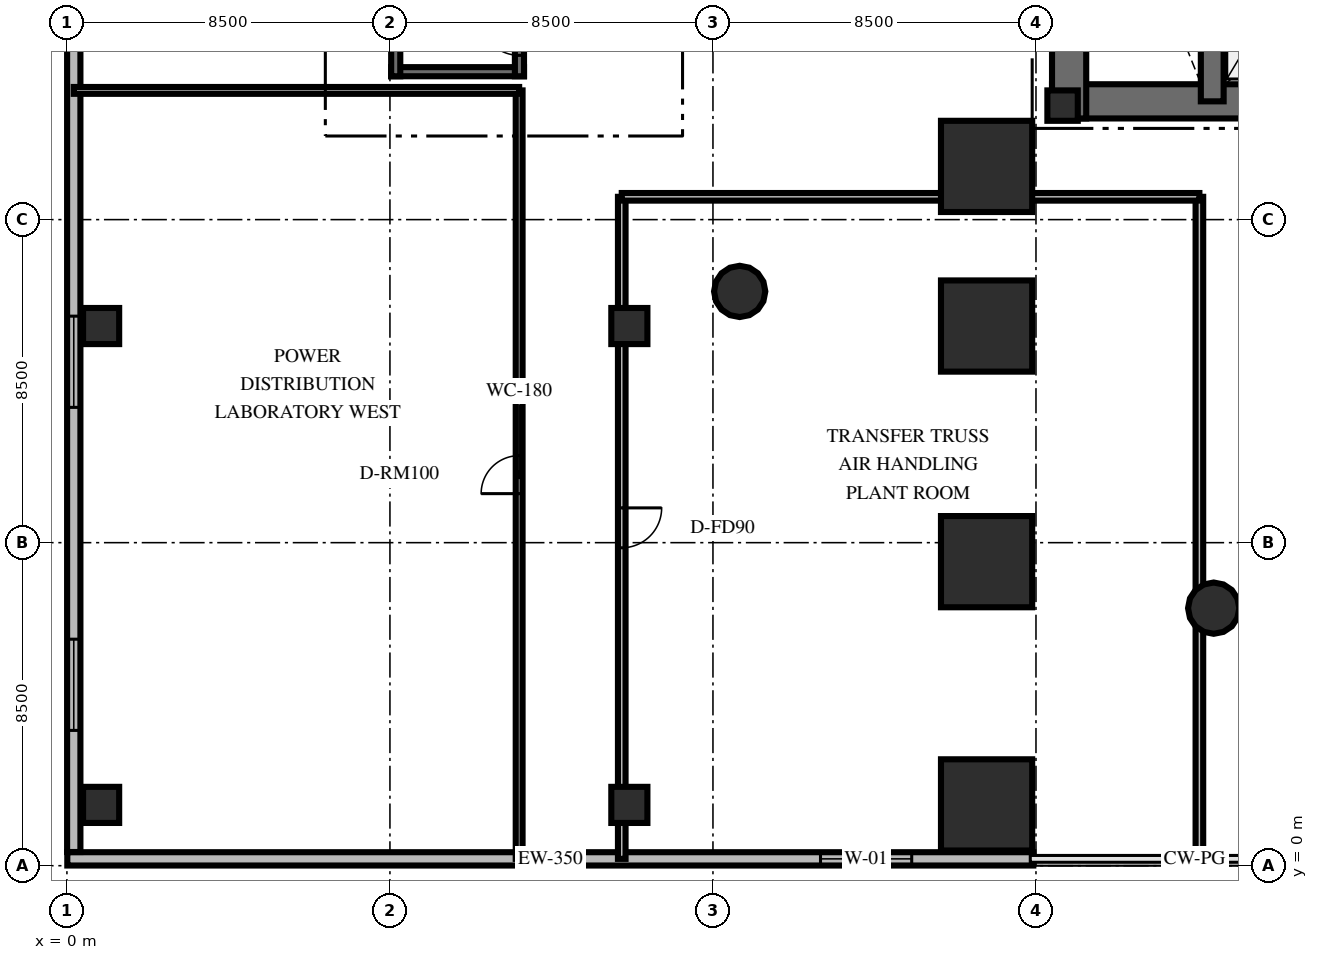
"""IFC4 building model, lengths in metres.
Left out: names, types, materials, properties, quantities, classifications, styles, units other than length and angle.
Written with IfcOpenShell. Run it as: python <this file> out.ifc"""

import sys

from ifc_helpers import new_model, si_unit, direction, frame, frame_2d, origin, origin_2d, place, context, subcontext, project, spatial, rectangle, circle, extrude, element, fill, save


model = new_model("IFC4")
c1 = context("Model", 3, precision=1e-05, world=origin(), true_north=direction((0.0, 1.0)))
c2 = subcontext(c1, "Body", "Model", "MODEL_VIEW")
j1 = project(units=[si_unit("LENGTHUNIT", "METRE"), si_unit("PLANEANGLEUNIT", "RADIAN")], contexts=[c1])
p1 = place(None, origin())
s1 = spatial("IfcSite", under=j1, at=p1, CompositionType="ELEMENT")
p2 = place(p1, origin())
s2 = spatial("IfcBuilding", under=s1, at=p2, CompositionType="ELEMENT")
p3 = place(p2, frame((0.0, 0.0, 15.6)))
s3 = spatial("IfcBuildingStorey", under=s2, at=p3, CompositionType="ELEMENT", Elevation=15.6)
p4 = place(p3, frame((25.922, 20.112, 0.0), z_axis=(0.0, 0.0, 1.0), x_axis=(1.0, 0.0, 0.0)))
e1 = element("IfcWall", 1, at=p4, inside=s3, PredefinedType="SHEAR", context=c2, shape_type="SweptSolid", body=[
    extrude(rectangle(XDim=16.166, YDim=0.9, at=frame_2d((8.083, 0.0))), origin(), (0.0, 0.0, 1.0), 4.8),
])
p5 = place(p3, frame((26.372, 19.662, 0.0), z_axis=(0.0, 0.0, 1.0), x_axis=(0.0, 1.0, 0.0)))
e2 = element("IfcWall", 2, at=p5, inside=s3, PredefinedType="SHEAR", context=c2, shape_type="SweptSolid", body=[
    extrude(rectangle(XDim=10.876, YDim=0.9, at=frame_2d((5.438, 0.0))), origin(), (0.0, 0.0, 1.0), 4.8),
])
p6 = place(p3, frame((30.138, 20.112, 0.0), z_axis=(0.0, 0.0, 1.0), x_axis=(0.0, 1.0, 0.0)))
e3 = element("IfcWall", 3, at=p6, inside=s3, PredefinedType="SHEAR", context=c2, shape_type="SweptSolid", body=[
    extrude(rectangle(XDim=9.976, YDim=0.6, at=frame_2d((4.988, 0.0))), origin(), (0.0, 0.0, 1.0), 4.8),
])
p7 = place(p3, frame((26.2, 20.0, 0.0), z_axis=(0.0, 0.0, 1.0), x_axis=(1.0, 0.0, 0.0)))
e4 = element("IfcColumn", 4, at=p7, inside=s3, PredefinedType="PILASTER", context=c2, shape_type="SweptSolid", body=[
    extrude(rectangle(XDim=0.8, YDim=0.8, at=origin_2d()), origin(), (0.0, 0.0, 1.0), 4.8),
])
p8 = place(p3, frame((8.532, 20.892, 0.0), z_axis=(0.0, 0.0, 1.0), x_axis=(1.0, 0.0, 0.0)))
e5 = element("IfcWall", 5, at=p8, inside=s3, PredefinedType="SHEAR", context=c2, shape_type="SweptSolid", body=[
    extrude(rectangle(XDim=3.496, YDim=0.24, at=frame_2d((1.748, 0.0))), origin(), (0.0, 0.0, 1.0), 4.8),
])
p9 = place(p3, frame((8.652, 20.772, 0.0), z_axis=(0.0, 0.0, 1.0), x_axis=(0.0, 1.0, 0.0)))
e6 = element("IfcWall", 6, at=p9, inside=s3, PredefinedType="SHEAR", context=c2, shape_type="SweptSolid", body=[
    extrude(rectangle(XDim=9.556, YDim=0.24, at=frame_2d((4.778, 0.0))), origin(), (0.0, 0.0, 1.0), 4.8),
])
p10 = place(p3, frame((11.908, 20.772, 0.0), z_axis=(0.0, 0.0, 1.0), x_axis=(0.0, 1.0, 0.0)))
e7 = element("IfcWall", 7, at=p10, inside=s3, PredefinedType="SHEAR", context=c2, shape_type="SweptSolid", body=[
    extrude(rectangle(XDim=9.556, YDim=0.24, at=frame_2d((4.778, 0.0))), origin(), (0.0, 0.0, 1.0), 4.8),
])
p11 = place(p10, frame((0.55, 0.0, 0.0)))
e8 = element("IfcOpeningElement", 8, at=p11, cuts=e7, PredefinedType="OPENING", context=c2, shape_type="SweptSolid", body=[
    extrude(rectangle(XDim=1.05, YDim=2.15, at=frame_2d((0.525, 1.075))), frame((0.0, 0.13, 0.0), z_axis=(0.0, -1.0, 0.0), x_axis=(1.0, 0.0, 0.0)), (0.0, 0.0, 1.0), 0.26),
])
for number, where, z_axis, x_axis in (
    (9, (24.2, 1.6, 0.0), (0.0, 0.0, 1.0), (1.0, 0.0, 0.0)),
    (10, (24.2, 8.0, 0.0), (0.0, 0.0, 1.0), (1.0, 0.0, 0.0)),
    (11, (24.2, 14.2, 0.0), (0.0, 0.0, 1.0), (1.0, 0.0, 0.0)),
    (12, (24.2, 18.4, 0.0), (0.0, 0.0, 1.0), (1.0, 0.0, 0.0)),
):
    element("IfcColumn", number, at=place(p3, frame(where, z_axis=z_axis, x_axis=x_axis)), inside=s3, PredefinedType="USERDEFINED", context=c2, shape_type="SweptSolid", body=[
        extrude(rectangle(XDim=2.4, YDim=2.4, at=origin_2d()), origin(), (0.0, 0.0, 1.0), 4.8),
    ])
for number, where, z_axis, x_axis in (
    (13, (0.9, 1.6, 0.0), (0.0, 0.0, 1.0), (1.0, 0.0, 0.0)),
    (14, (0.9, 14.2, 0.0), (0.0, 0.0, 1.0), (1.0, 0.0, 0.0)),
    (15, (14.8, 1.6, 0.0), (0.0, 0.0, 1.0), (1.0, 0.0, 0.0)),
    (16, (14.8, 14.2, 0.0), (0.0, 0.0, 1.0), (1.0, 0.0, 0.0)),
):
    element("IfcColumn", number, at=place(p3, frame(where, z_axis=z_axis, x_axis=x_axis)), inside=s3, PredefinedType="COLUMN", context=c2, shape_type="SweptSolid", body=[
        extrude(rectangle(XDim=0.95, YDim=0.95, at=origin_2d()), origin(), (0.0, 0.0, 1.0), 4.8),
    ])
p12 = place(p3, frame((17.703, 15.111, 0.0), z_axis=(0.0, 0.0, 1.0), x_axis=(1.0, 0.0, 0.0)))
e17 = element("IfcColumn", 17, at=p12, inside=s3, PredefinedType="COLUMN", context=c2, shape_type="SweptSolid", body=[
    extrude(circle(Radius=0.675, at=origin_2d()), origin(), (0.0, 0.0, 1.0), 4.8),
])
p13 = place(p3, frame((30.176, 6.777, -0.32), z_axis=(0.0, 0.0, 1.0), x_axis=(1.0, 0.0, 0.0)))
e18 = element("IfcColumn", 18, at=p13, inside=s3, PredefinedType="COLUMN", context=c2, shape_type="SweptSolid", body=[
    extrude(circle(Radius=0.675, at=origin_2d()), origin(), (0.0, 0.0, 1.0), 5.12),
])
p14 = place(p3, frame((25.43, 0.18, 0.0), z_axis=(0.0, 0.0, 1.0), x_axis=(-1.0, 0.0, 0.0)))
e19 = element("IfcWall", 19, at=p14, inside=s3, PredefinedType="SOLIDWALL", context=c2, shape_type="SweptSolid", body=[
    extrude(rectangle(XDim=25.42, YDim=0.35, at=frame_2d((12.71, 0.0))), origin(), (0.0, 0.0, 1.0), 3.76),
])
p15 = place(p14, frame((3.2, 0.0, 0.85)))
e20 = element("IfcOpeningElement", 20, at=p15, cuts=e19, PredefinedType="OPENING", context=c2, shape_type="SweptSolid", body=[
    extrude(rectangle(XDim=2.4, YDim=2.4, at=frame_2d((1.2, 1.2))), frame((0.0, 0.185, 0.0), z_axis=(0.0, -1.0, 0.0), x_axis=(1.0, 0.0, 0.0)), (0.0, 0.0, 1.0), 0.37),
])
p16 = place(p3, frame((0.18, 0.36, 0.0), z_axis=(0.0, 0.0, 1.0), x_axis=(0.0, 1.0, 0.0)))
e21 = element("IfcWall", 21, at=p16, inside=s3, PredefinedType="SOLIDWALL", context=c2, shape_type="SweptSolid", body=[
    extrude(rectangle(XDim=51.28, YDim=0.35, at=frame_2d((25.64, 0.0))), origin(), (0.0, 0.0, 1.0), 3.76),
])
p17 = place(p16, frame((3.2, 0.0, 0.85)))
e22 = element("IfcOpeningElement", 22, at=p17, cuts=e21, PredefinedType="OPENING", context=c2, shape_type="SweptSolid", body=[
    extrude(rectangle(XDim=2.4, YDim=2.4, at=frame_2d((1.2, 1.2))), frame((0.0, 0.185, 0.0), z_axis=(0.0, -1.0, 0.0), x_axis=(1.0, 0.0, 0.0)), (0.0, 0.0, 1.0), 0.37),
])
p18 = place(p16, frame((11.7, 0.0, 0.85)))
e23 = element("IfcOpeningElement", 23, at=p18, cuts=e21, PredefinedType="OPENING", context=c2, shape_type="SweptSolid", body=[
    extrude(rectangle(XDim=2.4, YDim=2.4, at=frame_2d((1.2, 1.2))), frame((0.0, 0.185, 0.0), z_axis=(0.0, -1.0, 0.0), x_axis=(1.0, 0.0, 0.0)), (0.0, 0.0, 1.0), 0.37),
])
p19 = place(p16, frame((22.05, 0.0, 0.85)))
e24 = element("IfcOpeningElement", 24, at=p19, cuts=e21, PredefinedType="OPENING", context=c2, shape_type="SweptSolid", body=[
    extrude(rectangle(XDim=2.4, YDim=2.4, at=frame_2d((1.2, 1.2))), frame((0.0, 0.185, 0.0), z_axis=(0.0, -1.0, 0.0), x_axis=(1.0, 0.0, 0.0)), (0.0, 0.0, 1.0), 0.37),
])
p20 = place(p16, frame((37.2, 0.0, 0.85)))
e25 = element("IfcOpeningElement", 25, at=p20, cuts=e21, PredefinedType="OPENING", context=c2, shape_type="SweptSolid", body=[
    extrude(rectangle(XDim=2.4, YDim=2.4, at=frame_2d((1.2, 1.2))), frame((0.0, 0.185, 0.0), z_axis=(0.0, -1.0, 0.0), x_axis=(1.0, 0.0, 0.0)), (0.0, 0.0, 1.0), 0.37),
])
p21 = place(p3, frame((11.9, 0.18, 0.0), z_axis=(0.0, 0.0, 1.0), x_axis=(0.0, 1.0, 0.0)))
e26 = element("IfcWall", 26, at=p21, inside=s3, PredefinedType="PARTITIONING", context=c2, shape_type="SweptSolid", body=[
    extrude(rectangle(XDim=20.22, YDim=0.18, at=frame_2d((10.11, 0.0))), origin(), (0.0, 0.0, 1.0), 2.61),
])
p22 = place(p21, frame((9.61, 0.0, 0.0)))
e27 = element("IfcOpeningElement", 27, at=p22, cuts=e26, PredefinedType="OPENING", context=c2, shape_type="SweptSolid", body=[
    extrude(rectangle(XDim=1.0, YDim=2.15, at=frame_2d((0.5, 1.075))), frame((0.0, 0.1, 0.0), z_axis=(0.0, -1.0, 0.0), x_axis=(1.0, 0.0, 0.0)), (0.0, 0.0, 1.0), 0.2),
])
p23 = place(p3, frame((11.9, 20.4, 0.0), z_axis=(0.0, 0.0, 1.0), x_axis=(-1.0, 0.0, 0.0)))
e28 = element("IfcWall", 28, at=p23, inside=s3, PredefinedType="PARTITIONING", context=c2, shape_type="SweptSolid", body=[
    extrude(rectangle(XDim=11.72, YDim=0.18, at=frame_2d((5.86, 0.0))), origin(), (0.0, 0.0, 1.0), 2.61),
])
p24 = place(p3, frame((14.6, 17.6, 0.0), z_axis=(0.0, 0.0, 1.0), x_axis=(0.0, -1.0, 0.0)))
e29 = element("IfcWall", 29, at=p24, inside=s3, PredefinedType="SOLIDWALL", context=c2, shape_type="SweptSolid", body=[
    extrude(rectangle(XDim=17.42, YDim=0.2, at=frame_2d((8.71, 0.0))), origin(), (0.0, 0.0, 1.0), 2.61),
])
p25 = place(p24, frame((8.185, 0.0, 0.0)))
e30 = element("IfcOpeningElement", 30, at=p25, cuts=e29, PredefinedType="OPENING", context=c2, shape_type="SweptSolid", body=[
    extrude(rectangle(XDim=1.05, YDim=2.15, at=frame_2d((0.525, 1.075))), frame((0.0, 0.11, 0.0), z_axis=(0.0, -1.0, 0.0), x_axis=(1.0, 0.0, 0.0)), (0.0, 0.0, 1.0), 0.22),
])
p26 = place(p3, frame((29.8, 0.18, 0.0), z_axis=(0.0, 0.0, 1.0), x_axis=(0.0, 1.0, 0.0)))
e31 = element("IfcWall", 31, at=p26, inside=s3, PredefinedType="SOLIDWALL", context=c2, shape_type="SweptSolid", body=[
    extrude(rectangle(XDim=17.42, YDim=0.2, at=frame_2d((8.71, 0.0))), origin(), (0.0, 0.0, 1.0), 2.61),
])
p27 = place(p3, frame((29.8, 17.6, 0.0), z_axis=(0.0, 0.0, 1.0), x_axis=(-1.0, 0.0, 0.0)))
e32 = element("IfcWall", 32, at=p27, inside=s3, PredefinedType="SOLIDWALL", context=c2, shape_type="SweptSolid", body=[
    extrude(rectangle(XDim=15.2, YDim=0.2, at=frame_2d((7.6, 0.0))), origin(), (0.0, 0.0, 1.0), 2.61),
])
p28 = place(p15, origin())
e33 = element("IfcWindow", 33, at=p28, inside=s3, PartitioningType="SINGLE_PANEL", PredefinedType="WINDOW", context=c2, shape_type="SweptSolid", body=[
    extrude(rectangle(XDim=2.4, YDim=2.4, at=frame_2d((1.2, 1.2))), frame((0.0, 0.03, 0.0), z_axis=(0.0, -1.0, 0.0), x_axis=(1.0, 0.0, 0.0)), (0.0, 0.0, 1.0), 0.06),
])
fill(e20, e33)
p29 = place(p17, origin())
e34 = element("IfcWindow", 34, at=p29, inside=s3, PartitioningType="SINGLE_PANEL", PredefinedType="WINDOW", context=c2, shape_type="SweptSolid", body=[
    extrude(rectangle(XDim=2.4, YDim=2.4, at=frame_2d((1.2, 1.2))), frame((0.0, 0.03, 0.0), z_axis=(0.0, -1.0, 0.0), x_axis=(1.0, 0.0, 0.0)), (0.0, 0.0, 1.0), 0.06),
])
fill(e22, e34)
p30 = place(p18, origin())
e35 = element("IfcWindow", 35, at=p30, inside=s3, PartitioningType="SINGLE_PANEL", PredefinedType="WINDOW", context=c2, shape_type="SweptSolid", body=[
    extrude(rectangle(XDim=2.4, YDim=2.4, at=frame_2d((1.2, 1.2))), frame((0.0, 0.03, 0.0), z_axis=(0.0, -1.0, 0.0), x_axis=(1.0, 0.0, 0.0)), (0.0, 0.0, 1.0), 0.06),
])
fill(e23, e35)
p31 = place(p11, origin())
e36 = element("IfcDoor", 36, at=p31, inside=s3, OperationType="SINGLE_SWING_RIGHT", PredefinedType="DOOR", context=c2, shape_type="SweptSolid", body=[
    extrude(rectangle(XDim=1.05, YDim=2.15, at=frame_2d((0.525, 1.075))), frame((0.0, 0.025, 0.0), z_axis=(0.0, -1.0, 0.0), x_axis=(1.0, 0.0, 0.0)), (0.0, 0.0, 1.0), 0.05),
])
fill(e8, e36)
p32 = place(p22, origin())
e37 = element("IfcDoor", 37, at=p32, inside=s3, OperationType="SINGLE_SWING_LEFT", PredefinedType="DOOR", context=c2, shape_type="SweptSolid", body=[
    extrude(rectangle(XDim=1.0, YDim=2.15, at=frame_2d((0.5, 1.075))), frame((0.0, 0.025, 0.0), z_axis=(0.0, -1.0, 0.0), x_axis=(1.0, 0.0, 0.0)), (0.0, 0.0, 1.0), 0.05),
])
fill(e27, e37)
p33 = place(p25, origin())
e38 = element("IfcDoor", 38, at=p33, inside=s3, OperationType="SINGLE_SWING_LEFT", PredefinedType="DOOR", context=c2, shape_type="SweptSolid", body=[
    extrude(rectangle(XDim=1.05, YDim=2.15, at=frame_2d((0.525, 1.075))), frame((0.0, 0.025, 0.0), z_axis=(0.0, -1.0, 0.0), x_axis=(1.0, 0.0, 0.0)), (0.0, 0.0, 1.0), 0.05),
])
fill(e30, e38)
save(model, sys.argv[1])
